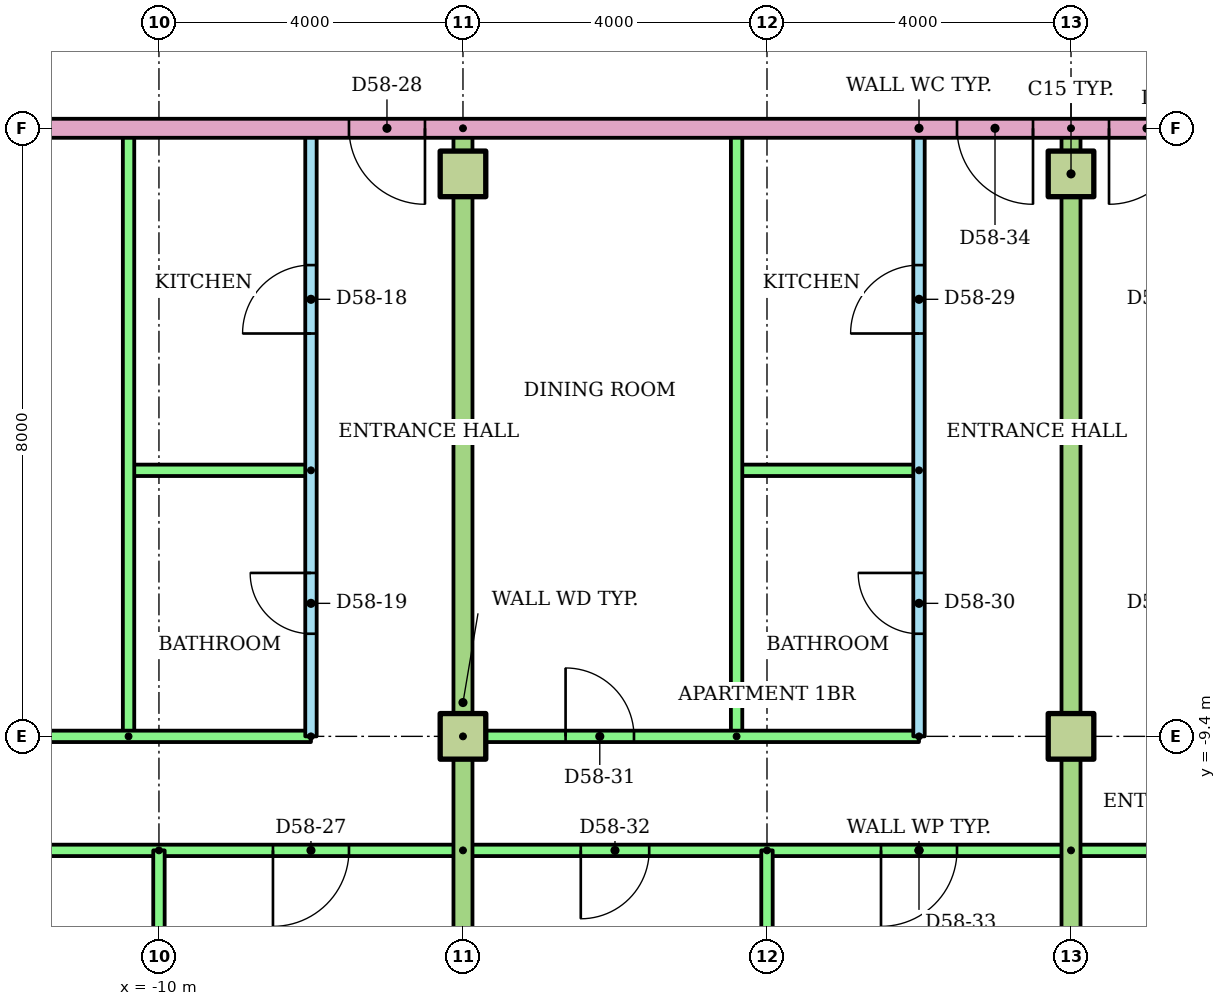
"""IFC4 building model, lengths in metres.
Left out: names, types, materials, properties, quantities, classifications, styles, units other than length and angle.
Written with IfcOpenShell. Run it as: python <this file> out.ifc"""

import sys

from ifc_helpers import new_model, si_unit, direction, frame, frame_2d, origin, origin_2d, place, context, subcontext, project, spatial, rectangle, extrude, element, fill, save


model = new_model("IFC4")
c1 = context("Model", 3, precision=1e-05, world=origin(), true_north=direction((0.0, 1.0)))
c2 = subcontext(c1, "Body", "Model", "MODEL_VIEW")
j1 = project(units=[si_unit("LENGTHUNIT", "METRE"), si_unit("PLANEANGLEUNIT", "RADIAN")], contexts=[c1])
p1 = place(None, origin())
s1 = spatial("IfcSite", under=j1, at=p1, CompositionType="ELEMENT")
p2 = place(p1, origin())
s2 = spatial("IfcBuilding", under=s1, at=p2, CompositionType="ELEMENT")
p3 = place(p2, frame((0.0, 0.0, 223.6)))
s3 = spatial("IfcBuildingStorey", under=s2, at=p3, CompositionType="ELEMENT", Elevation=223.6)
for number, where in (
    (1, (-6.0, -9.4, 0.0)),
    (2, (2.0, -9.4, 0.0)),
    (3, (-6.0, -2.0, 0.0)),
    (4, (2.0, -2.0, 0.0)),
):
    element("IfcColumn", number, at=place(p3, frame(where)), inside=s3, PredefinedType="COLUMN", context=c2, shape_type="SweptSolid", body=[
        extrude(rectangle(XDim=0.6, YDim=0.6, at=origin_2d()), origin(), (0.0, 0.0, 1.0), 3.2),
    ])
p4 = place(p3, frame((-8.0, -9.4, 0.0), z_axis=(0.0, 0.0, 1.0), x_axis=(0.0, 1.0, 0.0)))
e5 = element("IfcWall", 5, at=p4, inside=s3, PredefinedType="PARTITIONING", context=c2, shape_type="SweptSolid", body=[
    extrude(rectangle(XDim=8.0, YDim=0.15, at=frame_2d((4.0, 0.0))), origin(), (0.0, 0.0, 1.0), 2.4),
])
p5 = place(p4, frame((5.3, 0.0, 0.0)))
e6 = element("IfcOpeningElement", 6, at=p5, cuts=e5, PredefinedType="OPENING", context=c2, shape_type="SweptSolid", body=[
    extrude(rectangle(XDim=0.9, YDim=2.1, at=frame_2d((0.45, 1.05))), frame((0.0, 0.085, 0.0), z_axis=(0.0, -1.0, 0.0), x_axis=(1.0, 0.0, 0.0)), (0.0, 0.0, 1.0), 0.17),
])
p6 = place(p4, frame((1.35, 0.0, 0.0)))
e7 = element("IfcOpeningElement", 7, at=p6, cuts=e5, PredefinedType="OPENING", context=c2, shape_type="SweptSolid", body=[
    extrude(rectangle(XDim=0.8, YDim=2.1, at=frame_2d((0.4, 1.05))), frame((0.0, 0.085, 0.0), z_axis=(0.0, -1.0, 0.0), x_axis=(1.0, 0.0, 0.0)), (0.0, 0.0, 1.0), 0.17),
])
p7 = place(p3, frame((-8.0, -5.9, 0.0), z_axis=(0.0, 0.0, 1.0), x_axis=(-1.0, 0.0, 0.0)))
e8 = element("IfcWall", 8, at=p7, inside=s3, PredefinedType="PARTITIONING", context=c2, shape_type="SweptSolid", body=[
    extrude(rectangle(XDim=2.4, YDim=0.15, at=frame_2d((1.2, 0.0))), origin(), (0.0, 0.0, 1.0), 2.4),
])
p8 = place(p3, frame((-10.4, -9.4, 0.0), z_axis=(0.0, 0.0, 1.0), x_axis=(0.0, 1.0, 0.0)))
e9 = element("IfcWall", 9, at=p8, inside=s3, PredefinedType="PARTITIONING", context=c2, shape_type="SweptSolid", body=[
    extrude(rectangle(XDim=8.0, YDim=0.15, at=frame_2d((4.0, 0.0))), origin(), (0.0, 0.0, 1.0), 2.4),
])
p9 = place(p3, frame((-28.91, -9.4, 0.0)))
e10 = element("IfcWall", 10, at=p9, inside=s3, PredefinedType="PARTITIONING", context=c2, shape_type="SweptSolid", body=[
    extrude(rectangle(XDim=20.91, YDim=0.15, at=frame_2d((10.455, 0.0))), origin(), (0.0, 0.0, 1.0), 2.4),
])
p10 = place(p9, frame((13.534, 0.0, 0.0)))
e11 = element("IfcOpeningElement", 11, at=p10, cuts=e10, PredefinedType="OPENING", context=c2, shape_type="SweptSolid", body=[
    extrude(rectangle(XDim=0.9, YDim=2.1, at=frame_2d((0.45, 1.05))), frame((0.0, 0.085, 0.0), z_axis=(0.0, -1.0, 0.0), x_axis=(1.0, 0.0, 0.0)), (0.0, 0.0, 1.0), 0.17),
])
p11 = place(p9, frame((7.386, 0.0, 0.0)))
e12 = element("IfcOpeningElement", 12, at=p11, cuts=e10, PredefinedType="OPENING", context=c2, shape_type="SweptSolid", body=[
    extrude(rectangle(XDim=0.9, YDim=2.1, at=frame_2d((0.45, 1.05))), frame((0.0, 0.085, 0.0), z_axis=(0.0, -1.0, 0.0), x_axis=(1.0, 0.0, 0.0)), (0.0, 0.0, 1.0), 0.17),
])
p12 = place(p9, frame((2.035, 0.0, 0.0)))
e13 = element("IfcOpeningElement", 13, at=p12, cuts=e10, PredefinedType="OPENING", context=c2, shape_type="SweptSolid", body=[
    extrude(rectangle(XDim=0.9, YDim=2.1, at=frame_2d((0.45, 1.05))), frame((0.0, 0.085, 0.0), z_axis=(0.0, -1.0, 0.0), x_axis=(1.0, 0.0, 0.0)), (0.0, 0.0, 1.0), 0.17),
])
p13 = place(p3, frame((-6.0, -10.9, 0.0), z_axis=(0.0, 0.0, 1.0), x_axis=(-1.0, 0.0, 0.0)))
e14 = element("IfcWall", 14, at=p13, inside=s3, PredefinedType="PARTITIONING", context=c2, shape_type="SweptSolid", body=[
    extrude(rectangle(XDim=22.92, YDim=0.15, at=frame_2d((11.46, 0.0))), origin(), (0.0, 0.0, 1.0), 2.4),
])
p14 = place(p13, frame((20.0, 0.0, 0.0)))
e15 = element("IfcOpeningElement", 15, at=p14, cuts=e14, PredefinedType="OPENING", context=c2, shape_type="SweptSolid", body=[
    extrude(rectangle(XDim=0.9, YDim=2.1, at=frame_2d((0.45, 1.05))), frame((0.0, 0.085, 0.0), z_axis=(0.0, -1.0, 0.0), x_axis=(1.0, 0.0, 0.0)), (0.0, 0.0, 1.0), 0.17),
])
p15 = place(p13, frame((14.624, 0.0, 0.0)))
e16 = element("IfcOpeningElement", 16, at=p15, cuts=e14, PredefinedType="OPENING", context=c2, shape_type="SweptSolid", body=[
    extrude(rectangle(XDim=0.9, YDim=2.1, at=frame_2d((0.45, 1.05))), frame((0.0, 0.085, 0.0), z_axis=(0.0, -1.0, 0.0), x_axis=(1.0, 0.0, 0.0)), (0.0, 0.0, 1.0), 0.17),
])
p16 = place(p13, frame((9.55, 0.0, 0.0)))
e17 = element("IfcOpeningElement", 17, at=p16, cuts=e14, PredefinedType="OPENING", context=c2, shape_type="SweptSolid", body=[
    extrude(rectangle(XDim=0.9, YDim=2.1, at=frame_2d((0.45, 1.05))), frame((0.0, 0.085, 0.0), z_axis=(0.0, -1.0, 0.0), x_axis=(1.0, 0.0, 0.0)), (0.0, 0.0, 1.0), 0.17),
])
p17 = place(p13, frame((5.55, 0.0, 0.0)))
e18 = element("IfcOpeningElement", 18, at=p17, cuts=e14, PredefinedType="OPENING", context=c2, shape_type="SweptSolid", body=[
    extrude(rectangle(XDim=0.9, YDim=2.1, at=frame_2d((0.45, 1.05))), frame((0.0, 0.085, 0.0), z_axis=(0.0, -1.0, 0.0), x_axis=(1.0, 0.0, 0.0)), (0.0, 0.0, 1.0), 0.17),
])
p18 = place(p13, frame((1.5, 0.0, 0.0)))
e19 = element("IfcOpeningElement", 19, at=p18, cuts=e14, PredefinedType="OPENING", context=c2, shape_type="SweptSolid", body=[
    extrude(rectangle(XDim=1.0, YDim=2.1, at=frame_2d((0.5, 1.05))), frame((0.0, 0.085, 0.0), z_axis=(0.0, -1.0, 0.0), x_axis=(1.0, 0.0, 0.0)), (0.0, 0.0, 1.0), 0.17),
])
p19 = place(p3, frame((-10.0, -10.9, 0.0), z_axis=(0.0, 0.0, 1.0), x_axis=(0.0, -1.0, 0.0)))
e20 = element("IfcWall", 20, at=p19, inside=s3, PredefinedType="PARTITIONING", context=c2, shape_type="SweptSolid", body=[
    extrude(rectangle(XDim=5.621, YDim=0.15, at=frame_2d((2.811, 0.0))), origin(), (0.0, 0.0, 1.0), 2.4),
])
p20 = place(p3, frame((0.0, -9.4, 0.0), z_axis=(0.0, 0.0, 1.0), x_axis=(0.0, 1.0, 0.0)))
e21 = element("IfcWall", 21, at=p20, inside=s3, PredefinedType="PARTITIONING", context=c2, shape_type="SweptSolid", body=[
    extrude(rectangle(XDim=8.0, YDim=0.15, at=frame_2d((4.0, 0.0))), origin(), (0.0, 0.0, 1.0), 2.4),
])
p21 = place(p20, frame((5.3, 0.0, 0.0)))
e22 = element("IfcOpeningElement", 22, at=p21, cuts=e21, PredefinedType="OPENING", context=c2, shape_type="SweptSolid", body=[
    extrude(rectangle(XDim=0.9, YDim=2.1, at=frame_2d((0.45, 1.05))), frame((0.0, 0.085, 0.0), z_axis=(0.0, -1.0, 0.0), x_axis=(1.0, 0.0, 0.0)), (0.0, 0.0, 1.0), 0.17),
])
p22 = place(p20, frame((1.35, 0.0, 0.0)))
e23 = element("IfcOpeningElement", 23, at=p22, cuts=e21, PredefinedType="OPENING", context=c2, shape_type="SweptSolid", body=[
    extrude(rectangle(XDim=0.8, YDim=2.1, at=frame_2d((0.4, 1.05))), frame((0.0, 0.085, 0.0), z_axis=(0.0, -1.0, 0.0), x_axis=(1.0, 0.0, 0.0)), (0.0, 0.0, 1.0), 0.17),
])
p23 = place(p3, frame((0.0, -5.9, 0.0), z_axis=(0.0, 0.0, 1.0), x_axis=(-1.0, 0.0, 0.0)))
e24 = element("IfcWall", 24, at=p23, inside=s3, PredefinedType="PARTITIONING", context=c2, shape_type="SweptSolid", body=[
    extrude(rectangle(XDim=2.4, YDim=0.15, at=frame_2d((1.2, 0.0))), origin(), (0.0, 0.0, 1.0), 2.4),
])
p24 = place(p3, frame((-2.4, -9.4, 0.0), z_axis=(0.0, 0.0, 1.0), x_axis=(0.0, 1.0, 0.0)))
e25 = element("IfcWall", 25, at=p24, inside=s3, PredefinedType="PARTITIONING", context=c2, shape_type="SweptSolid", body=[
    extrude(rectangle(XDim=8.0, YDim=0.15, at=frame_2d((4.0, 0.0))), origin(), (0.0, 0.0, 1.0), 2.4),
])
p25 = place(p3, frame((-6.0, -9.4, 0.0)))
e26 = element("IfcWall", 26, at=p25, inside=s3, PredefinedType="PARTITIONING", context=c2, shape_type="SweptSolid", body=[
    extrude(rectangle(XDim=6.0, YDim=0.15, at=frame_2d((3.0, 0.0))), origin(), (0.0, 0.0, 1.0), 2.4),
])
p26 = place(p25, frame((1.35, 0.0, 0.0)))
e27 = element("IfcOpeningElement", 27, at=p26, cuts=e26, PredefinedType="OPENING", context=c2, shape_type="SweptSolid", body=[
    extrude(rectangle(XDim=0.9, YDim=2.1, at=frame_2d((0.45, 1.05))), frame((0.0, 0.085, 0.0), z_axis=(0.0, -1.0, 0.0), x_axis=(1.0, 0.0, 0.0)), (0.0, 0.0, 1.0), 0.17),
])
p27 = place(p3, frame((2.0, -10.9, 0.0), z_axis=(0.0, 0.0, 1.0), x_axis=(-1.0, 0.0, 0.0)))
e28 = element("IfcWall", 28, at=p27, inside=s3, PredefinedType="PARTITIONING", context=c2, shape_type="SweptSolid", body=[
    extrude(rectangle(XDim=8.0, YDim=0.15, at=frame_2d((4.0, 0.0))), origin(), (0.0, 0.0, 1.0), 2.4),
])
p28 = place(p27, frame((5.55, 0.0, 0.0)))
e29 = element("IfcOpeningElement", 29, at=p28, cuts=e28, PredefinedType="OPENING", context=c2, shape_type="SweptSolid", body=[
    extrude(rectangle(XDim=0.9, YDim=2.1, at=frame_2d((0.45, 1.05))), frame((0.0, 0.085, 0.0), z_axis=(0.0, -1.0, 0.0), x_axis=(1.0, 0.0, 0.0)), (0.0, 0.0, 1.0), 0.17),
])
p29 = place(p27, frame((1.5, 0.0, 0.0)))
e30 = element("IfcOpeningElement", 30, at=p29, cuts=e28, PredefinedType="OPENING", context=c2, shape_type="SweptSolid", body=[
    extrude(rectangle(XDim=1.0, YDim=2.1, at=frame_2d((0.5, 1.05))), frame((0.0, 0.085, 0.0), z_axis=(0.0, -1.0, 0.0), x_axis=(1.0, 0.0, 0.0)), (0.0, 0.0, 1.0), 0.17),
])
p30 = place(p3, frame((-2.0, -10.9, 0.0), z_axis=(0.0, 0.0, 1.0), x_axis=(0.0, -1.0, 0.0)))
e31 = element("IfcWall", 31, at=p30, inside=s3, PredefinedType="PARTITIONING", context=c2, shape_type="SweptSolid", body=[
    extrude(rectangle(XDim=5.621, YDim=0.15, at=frame_2d((2.811, 0.0))), origin(), (0.0, 0.0, 1.0), 2.4),
])
p31 = place(p3, frame((-6.0, -1.4, 0.0), z_axis=(0.0, 0.0, 1.0), x_axis=(0.0, -1.0, 0.0)))
e32 = element("IfcWall", 32, at=p31, inside=s3, PredefinedType="PARTITIONING", context=c2, shape_type="SweptSolid", body=[
    extrude(rectangle(XDim=15.11, YDim=0.25, at=frame_2d((7.555, 0.0))), origin(), (0.0, 0.0, 1.0), 2.4),
])
p32 = place(p3, frame((28.92, -10.9, 0.0), z_axis=(0.0, 0.0, 1.0), x_axis=(-1.0, 0.0, 0.0)))
e33 = element("IfcWall", 33, at=p32, inside=s3, PredefinedType="PARTITIONING", context=c2, shape_type="SweptSolid", body=[
    extrude(rectangle(XDim=26.92, YDim=0.15, at=frame_2d((13.46, 0.0))), origin(), (0.0, 0.0, 1.0), 2.4),
])
p33 = place(p32, frame((22.42, 0.0, 0.0)))
e34 = element("IfcOpeningElement", 34, at=p33, cuts=e33, PredefinedType="OPENING", context=c2, shape_type="SweptSolid", body=[
    extrude(rectangle(XDim=1.0, YDim=2.1, at=frame_2d((0.5, 1.05))), frame((0.0, 0.085, 0.0), z_axis=(0.0, -1.0, 0.0), x_axis=(1.0, 0.0, 0.0)), (0.0, 0.0, 1.0), 0.17),
])
p34 = place(p32, frame((16.47, 0.0, 0.0)))
e35 = element("IfcOpeningElement", 35, at=p34, cuts=e33, PredefinedType="OPENING", context=c2, shape_type="SweptSolid", body=[
    extrude(rectangle(XDim=0.9, YDim=2.1, at=frame_2d((0.45, 1.05))), frame((0.0, 0.085, 0.0), z_axis=(0.0, -1.0, 0.0), x_axis=(1.0, 0.0, 0.0)), (0.0, 0.0, 1.0), 0.17),
])
p35 = place(p32, frame((12.47, 0.0, 0.0)))
e36 = element("IfcOpeningElement", 36, at=p35, cuts=e33, PredefinedType="OPENING", context=c2, shape_type="SweptSolid", body=[
    extrude(rectangle(XDim=0.9, YDim=2.1, at=frame_2d((0.45, 1.05))), frame((0.0, 0.085, 0.0), z_axis=(0.0, -1.0, 0.0), x_axis=(1.0, 0.0, 0.0)), (0.0, 0.0, 1.0), 0.17),
])
p36 = place(p32, frame((7.27, 0.0, 0.0)))
e37 = element("IfcOpeningElement", 37, at=p36, cuts=e33, PredefinedType="OPENING", context=c2, shape_type="SweptSolid", body=[
    extrude(rectangle(XDim=0.9, YDim=2.1, at=frame_2d((0.45, 1.05))), frame((0.0, 0.085, 0.0), z_axis=(0.0, -1.0, 0.0), x_axis=(1.0, 0.0, 0.0)), (0.0, 0.0, 1.0), 0.17),
])
p37 = place(p32, frame((1.544, 0.0, 0.0)))
e38 = element("IfcOpeningElement", 38, at=p37, cuts=e33, PredefinedType="OPENING", context=c2, shape_type="SweptSolid", body=[
    extrude(rectangle(XDim=0.9, YDim=2.1, at=frame_2d((0.45, 1.05))), frame((0.0, 0.085, 0.0), z_axis=(0.0, -1.0, 0.0), x_axis=(1.0, 0.0, 0.0)), (0.0, 0.0, 1.0), 0.17),
])
p38 = place(p3, frame((2.0, -1.4, 0.0), z_axis=(0.0, 0.0, 1.0), x_axis=(0.0, -1.0, 0.0)))
e39 = element("IfcWall", 39, at=p38, inside=s3, PredefinedType="PARTITIONING", context=c2, shape_type="SweptSolid", body=[
    extrude(rectangle(XDim=15.11, YDim=0.25, at=frame_2d((7.555, 0.0))), origin(), (0.0, 0.0, 1.0), 2.4),
])
p39 = place(p3, frame((14.0, -1.4, 0.0), z_axis=(0.0, 0.0, 1.0), x_axis=(-1.0, 0.0, 0.0)))
e40 = element("IfcWall", 40, at=p39, inside=s3, PredefinedType="PARTITIONING", context=c2, shape_type="SweptSolid", body=[
    extrude(rectangle(XDim=28.0, YDim=0.25, at=frame_2d((14.0, 0.0))), origin(), (0.0, 0.0, 1.0), 2.4),
])
p40 = place(p39, frame((20.5, 0.0, 0.0)))
e41 = element("IfcOpeningElement", 41, at=p40, cuts=e40, PredefinedType="OPENING", context=c2, shape_type="SweptSolid", body=[
    extrude(rectangle(XDim=1.0, YDim=2.1, at=frame_2d((0.5, 1.05))), frame((0.0, 0.135, 0.0), z_axis=(0.0, -1.0, 0.0), x_axis=(1.0, 0.0, 0.0)), (0.0, 0.0, 1.0), 0.27),
])
p41 = place(p39, frame((12.5, 0.0, 0.0)))
e42 = element("IfcOpeningElement", 42, at=p41, cuts=e40, PredefinedType="OPENING", context=c2, shape_type="SweptSolid", body=[
    extrude(rectangle(XDim=1.0, YDim=2.1, at=frame_2d((0.5, 1.05))), frame((0.0, 0.135, 0.0), z_axis=(0.0, -1.0, 0.0), x_axis=(1.0, 0.0, 0.0)), (0.0, 0.0, 1.0), 0.27),
])
p42 = place(p39, frame((10.5, 0.0, 0.0)))
e43 = element("IfcOpeningElement", 43, at=p42, cuts=e40, PredefinedType="OPENING", context=c2, shape_type="SweptSolid", body=[
    extrude(rectangle(XDim=1.0, YDim=2.1, at=frame_2d((0.5, 1.05))), frame((0.0, 0.135, 0.0), z_axis=(0.0, -1.0, 0.0), x_axis=(1.0, 0.0, 0.0)), (0.0, 0.0, 1.0), 0.27),
])
p43 = place(p5, origin())
e44 = element("IfcDoor", 44, at=p43, inside=s3, OperationType="SINGLE_SWING_LEFT", PredefinedType="DOOR", context=c2, shape_type="SweptSolid", body=[
    extrude(rectangle(XDim=0.9, YDim=2.1, at=frame_2d((0.45, 1.05))), frame((0.0, 0.025, 0.0), z_axis=(0.0, -1.0, 0.0), x_axis=(1.0, 0.0, 0.0)), (0.0, 0.0, 1.0), 0.05),
])
fill(e6, e44)
p44 = place(p6, origin())
e45 = element("IfcDoor", 45, at=p44, inside=s3, OperationType="SINGLE_SWING_RIGHT", PredefinedType="DOOR", context=c2, shape_type="SweptSolid", body=[
    extrude(rectangle(XDim=0.8, YDim=2.1, at=frame_2d((0.4, 1.05))), frame((0.0, 0.025, 0.0), z_axis=(0.0, -1.0, 0.0), x_axis=(1.0, 0.0, 0.0)), (0.0, 0.0, 1.0), 0.05),
])
fill(e7, e45)
p45 = place(p18, origin())
e46 = element("IfcDoor", 46, at=p45, inside=s3, OperationType="SINGLE_SWING_RIGHT", PredefinedType="DOOR", context=c2, shape_type="SweptSolid", body=[
    extrude(rectangle(XDim=1.0, YDim=2.1, at=frame_2d((0.5, 1.05))), frame((0.0, 0.025, 0.0), z_axis=(0.0, -1.0, 0.0), x_axis=(1.0, 0.0, 0.0)), (0.0, 0.0, 1.0), 0.05),
])
fill(e19, e46)
p46 = place(p40, origin())
e47 = element("IfcDoor", 47, at=p46, inside=s3, OperationType="SINGLE_SWING_LEFT", PredefinedType="DOOR", context=c2, shape_type="SweptSolid", body=[
    extrude(rectangle(XDim=1.0, YDim=2.1, at=frame_2d((0.5, 1.05))), frame((0.0, 0.025, 0.0), z_axis=(0.0, -1.0, 0.0), x_axis=(1.0, 0.0, 0.0)), (0.0, 0.0, 1.0), 0.05),
])
fill(e41, e47)
p47 = place(p21, origin())
e48 = element("IfcDoor", 48, at=p47, inside=s3, OperationType="SINGLE_SWING_LEFT", PredefinedType="DOOR", context=c2, shape_type="SweptSolid", body=[
    extrude(rectangle(XDim=0.9, YDim=2.1, at=frame_2d((0.45, 1.05))), frame((0.0, 0.025, 0.0), z_axis=(0.0, -1.0, 0.0), x_axis=(1.0, 0.0, 0.0)), (0.0, 0.0, 1.0), 0.05),
])
fill(e22, e48)
p48 = place(p22, origin())
e49 = element("IfcDoor", 49, at=p48, inside=s3, OperationType="SINGLE_SWING_RIGHT", PredefinedType="DOOR", context=c2, shape_type="SweptSolid", body=[
    extrude(rectangle(XDim=0.8, YDim=2.1, at=frame_2d((0.4, 1.05))), frame((0.0, 0.025, 0.0), z_axis=(0.0, -1.0, 0.0), x_axis=(1.0, 0.0, 0.0)), (0.0, 0.0, 1.0), 0.05),
])
fill(e23, e49)
p49 = place(p26, origin())
e50 = element("IfcDoor", 50, at=p49, inside=s3, OperationType="SINGLE_SWING_LEFT", PredefinedType="DOOR", context=c2, shape_type="SweptSolid", body=[
    extrude(rectangle(XDim=0.9, YDim=2.1, at=frame_2d((0.45, 1.05))), frame((0.0, 0.025, 0.0), z_axis=(0.0, -1.0, 0.0), x_axis=(1.0, 0.0, 0.0)), (0.0, 0.0, 1.0), 0.05),
])
fill(e27, e50)
p50 = place(p28, origin())
e51 = element("IfcDoor", 51, at=p50, inside=s3, OperationType="SINGLE_SWING_RIGHT", PredefinedType="DOOR", context=c2, shape_type="SweptSolid", body=[
    extrude(rectangle(XDim=0.9, YDim=2.1, at=frame_2d((0.45, 1.05))), frame((0.0, 0.025, 0.0), z_axis=(0.0, -1.0, 0.0), x_axis=(1.0, 0.0, 0.0)), (0.0, 0.0, 1.0), 0.05),
])
fill(e29, e51)
p51 = place(p29, origin())
e52 = element("IfcDoor", 52, at=p51, inside=s3, OperationType="SINGLE_SWING_RIGHT", PredefinedType="DOOR", context=c2, shape_type="SweptSolid", body=[
    extrude(rectangle(XDim=1.0, YDim=2.1, at=frame_2d((0.5, 1.05))), frame((0.0, 0.025, 0.0), z_axis=(0.0, -1.0, 0.0), x_axis=(1.0, 0.0, 0.0)), (0.0, 0.0, 1.0), 0.05),
])
fill(e30, e52)
p52 = place(p41, origin())
e53 = element("IfcDoor", 53, at=p52, inside=s3, OperationType="SINGLE_SWING_LEFT", PredefinedType="DOOR", context=c2, shape_type="SweptSolid", body=[
    extrude(rectangle(XDim=1.0, YDim=2.1, at=frame_2d((0.5, 1.05))), frame((0.0, 0.025, 0.0), z_axis=(0.0, -1.0, 0.0), x_axis=(1.0, 0.0, 0.0)), (0.0, 0.0, 1.0), 0.05),
])
fill(e42, e53)
p53 = place(p42, origin())
e54 = element("IfcDoor", 54, at=p53, inside=s3, OperationType="SINGLE_SWING_RIGHT", PredefinedType="DOOR", context=c2, shape_type="SweptSolid", body=[
    extrude(rectangle(XDim=1.0, YDim=2.1, at=frame_2d((0.5, 1.05))), frame((0.0, 0.025, 0.0), z_axis=(0.0, -1.0, 0.0), x_axis=(1.0, 0.0, 0.0)), (0.0, 0.0, 1.0), 0.05),
])
fill(e43, e54)
save(model, sys.argv[1])
